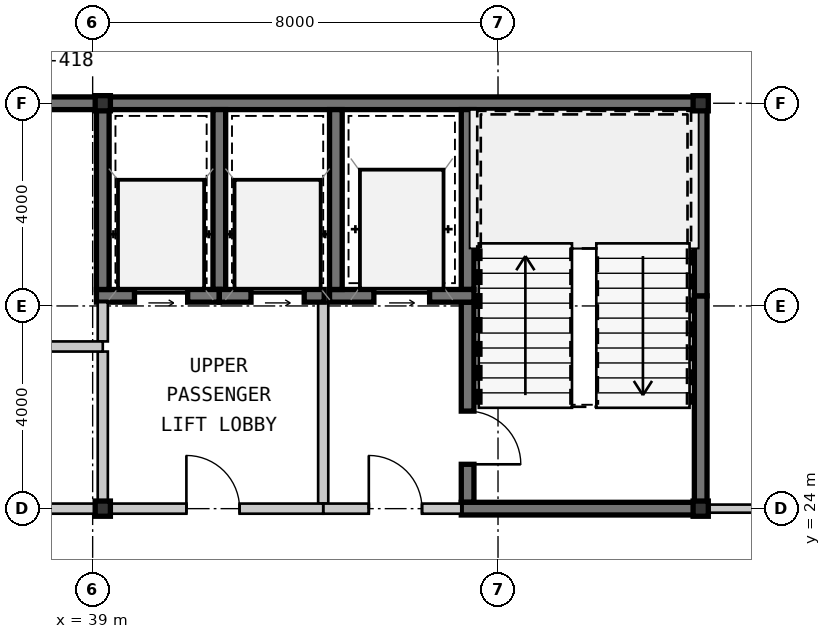
"""IFC4 building model, lengths in metres.
Left out: names, types, materials, properties, quantities, classifications, styles, units other than length and angle.
Written with IfcOpenShell. Run it as: python <this file> out.ifc"""

import sys

from ifc_helpers import new_model, si_unit, direction, frame, frame_2d, origin, origin_2d, place, context, subcontext, project, spatial, rectangle, hollow_rectangle, extrude, source, transform, mapped, element, fill, save


model = new_model("IFC4")
c1 = context("Model", 3, precision=1e-05, world=origin(), true_north=direction((0.0, 1.0)))
c2 = subcontext(c1, "Body", "Model", "MODEL_VIEW")
j1 = project(units=[si_unit("LENGTHUNIT", "METRE"), si_unit("PLANEANGLEUNIT", "RADIAN")], contexts=[c1])
p1 = place(None, origin())
s1 = spatial("IfcSite", under=j1, at=p1, CompositionType="ELEMENT")
p2 = place(p1, origin())
s2 = spatial("IfcBuilding", under=s1, at=p2, CompositionType="ELEMENT")
p3 = place(p2, frame((0.0, 0.0, 211.4)))
s3 = spatial("IfcBuildingStorey", under=s2, at=p3, CompositionType="ELEMENT", Elevation=211.4)
m1 = source(origin(), c2, "Body", "SweptSolid", [
    extrude(hollow_rectangle(XDim=0.3, YDim=0.3, WallThickness=0.012, at=origin_2d()), origin(), (0.0, 0.0, 1.0), 3.15),
])
for number, where, z_axis, x_axis in (
    (1, (39.2, 24.0, 0.0), (0.0, 0.0, 1.0), (1.0, 0.0, 0.0)),
    (2, (51.0, 24.0, 0.0), (0.0, 0.0, 1.0), (1.0, 0.0, 0.0)),
    (3, (39.2, 32.0, 0.0), (0.0, 0.0, 1.0), (1.0, 0.0, 0.0)),
    (4, (51.0, 32.0, 0.0), (0.0, 0.0, 1.0), (1.0, 0.0, 0.0)),
):
    element("IfcColumn", number, at=place(p3, frame(where, z_axis=z_axis, x_axis=x_axis)), inside=s3, PredefinedType="COLUMN", context=c2, shape_type="MappedRepresentation", body=[
        mapped(m1, transform((0.0, 0.0, 0.0), scale=1.0)),
    ])
m2 = source(origin(), c2, "Body", "SweptSolid", [
    extrude(rectangle(XDim=11.2, YDim=0.25, at=frame_2d((5.6, 0.0))), origin(), (0.0, 0.0, 1.0), 2.93),
])
p4 = place(p3, frame((28.0, 32.0, 0.0), z_axis=(0.0, 0.0, 1.0), x_axis=(1.0, 0.0, 0.0)))
e5 = element("IfcWall", 5, at=p4, inside=s3, PredefinedType="SHEAR", context=c2, shape_type="MappedRepresentation", body=[
    mapped(m2, transform((0.0, 0.0, 0.0), scale=1.0)),
])
m3 = source(origin(), c2, "Body", "SweptSolid", [
    extrude(rectangle(XDim=11.925, YDim=0.25, at=frame_2d((5.962, 0.0))), origin(), (0.0, 0.0, 1.0), 2.93),
])
p5 = place(p3, frame((39.2, 32.0, 0.0), z_axis=(0.0, 0.0, 1.0), x_axis=(1.0, 0.0, 0.0)))
e6 = element("IfcWall", 6, at=p5, inside=s3, PredefinedType="SHEAR", context=c2, shape_type="MappedRepresentation", body=[
    mapped(m3, transform((0.0, 0.0, 0.0), scale=1.0)),
])
m4 = source(origin(), c2, "Body", "SweptSolid", [
    extrude(rectangle(XDim=4.075, YDim=0.25, at=frame_2d((2.038, 0.0))), origin(), (0.0, 0.0, 1.0), 2.93),
])
p6 = place(p3, frame((51.0, 24.125, 0.0), z_axis=(0.0, 0.0, 1.0), x_axis=(0.0, 1.0, 0.0)))
e7 = element("IfcWall", 7, at=p6, inside=s3, PredefinedType="SHEAR", context=c2, shape_type="MappedRepresentation", body=[
    mapped(m4, transform((0.0, 0.0, 0.0), scale=1.0)),
])
m5 = source(origin(), c2, "Body", "SweptSolid", [
    extrude(rectangle(XDim=3.675, YDim=0.25, at=frame_2d((1.837, 0.0))), origin(), (0.0, 0.0, 1.0), 2.93),
])
p7 = place(p3, frame((51.0, 28.2, 0.0), z_axis=(0.0, 0.0, 1.0), x_axis=(0.0, 1.0, 0.0)))
e8 = element("IfcWall", 8, at=p7, inside=s3, PredefinedType="SHEAR", context=c2, shape_type="MappedRepresentation", body=[
    mapped(m5, transform((0.0, 0.0, 0.0), scale=1.0)),
])
m6 = source(origin(), c2, "Body", "SweptSolid", [
    extrude(rectangle(XDim=3.55, YDim=0.25, at=frame_2d((1.775, 0.0))), origin(), (0.0, 0.0, 1.0), 2.93),
])
p8 = place(p3, frame((46.4, 31.875, 0.0), z_axis=(0.0, 0.0, 1.0), x_axis=(0.0, -1.0, 0.0)))
e9 = element("IfcWall", 9, at=p8, inside=s3, PredefinedType="SHEAR", context=c2, shape_type="MappedRepresentation", body=[
    mapped(m6, transform((0.0, 0.0, 0.0), scale=1.0)),
])
m7 = source(origin(), c2, "Body", "SweptSolid", [
    extrude(rectangle(XDim=3.95, YDim=0.25, at=frame_2d((1.975, 0.0))), origin(), (0.0, 0.0, 1.0), 2.93),
])
p9 = place(p3, frame((46.4, 28.075, 0.0), z_axis=(0.0, 0.0, 1.0), x_axis=(0.0, -1.0, 0.0)))
e10 = element("IfcWall", 10, at=p9, inside=s3, PredefinedType="SHEAR", context=c2, shape_type="MappedRepresentation", body=[
    mapped(m7, transform((0.0, 0.0, 0.0), scale=1.0)),
])
m8 = source(origin(), c2, "Body", "SweptSolid", [
    extrude(rectangle(XDim=1.05, YDim=2.1, at=frame_2d((0.525, 1.05))), frame((0.0, 0.135, 0.0), z_axis=(0.0, -1.0, 0.0), x_axis=(1.0, 0.0, 0.0)), (0.0, 0.0, 1.0), 0.27),
])
p10 = place(p9, frame((2.15, 0.0, 0.0)))
e11 = element("IfcOpeningElement", 11, at=p10, cuts=e10, PredefinedType="OPENING", context=c2, shape_type="MappedRepresentation", body=[
    mapped(m8, transform((0.0, 0.0, 0.0), scale=1.0)),
])
m9 = source(origin(), c2, "Body", "SweptSolid", [
    extrude(rectangle(XDim=4.85, YDim=0.25, at=frame_2d((2.425, 0.0))), origin(), (0.0, 0.0, 1.0), 2.93),
])
p11 = place(p3, frame((46.275, 24.0, 0.0), z_axis=(0.0, 0.0, 1.0), x_axis=(1.0, 0.0, 0.0)))
e12 = element("IfcWall", 12, at=p11, inside=s3, PredefinedType="SHEAR", context=c2, shape_type="MappedRepresentation", body=[
    mapped(m9, transform((0.0, 0.0, 0.0), scale=1.0)),
])
m10 = source(origin(), c2, "Body", "SweptSolid", [
    extrude(rectangle(XDim=2.85, YDim=0.25, at=frame_2d((1.425, 0.0))), origin(), (0.0, 0.0, 1.0), 2.93),
])
p12 = place(p3, frame((43.675, 28.2, 0.0), z_axis=(0.0, 0.0, 1.0), x_axis=(1.0, 0.0, 0.0)))
e13 = element("IfcWall", 13, at=p12, inside=s3, PredefinedType="SHEAR", context=c2, shape_type="MappedRepresentation", body=[
    mapped(m10, transform((0.0, 0.0, 0.0), scale=1.0)),
])
m11 = source(origin(), c2, "Body", "SweptSolid", [
    extrude(rectangle(XDim=1.1, YDim=2.15, at=frame_2d((0.55, 1.075))), frame((0.0, 0.135, 0.0), z_axis=(0.0, -1.0, 0.0), x_axis=(1.0, 0.0, 0.0)), (0.0, 0.0, 1.0), 0.27),
])
p13 = place(p12, frame((0.875, 0.0, 0.0)))
e14 = element("IfcOpeningElement", 14, at=p13, cuts=e13, PredefinedType="OPENING", context=c2, shape_type="MappedRepresentation", body=[
    mapped(m11, transform((0.0, 0.0, 0.0), scale=1.0)),
])
p14 = place(p3, frame((43.8, 31.875, 0.0), z_axis=(0.0, 0.0, 1.0), x_axis=(0.0, -1.0, 0.0)))
e15 = element("IfcWall", 15, at=p14, inside=s3, PredefinedType="SHEAR", context=c2, shape_type="MappedRepresentation", body=[
    mapped(m6, transform((0.0, 0.0, 0.0), scale=1.0)),
])
m12 = source(origin(), c2, "Body", "SweptSolid", [
    extrude(rectangle(XDim=3.975, YDim=0.2, at=frame_2d((1.987, 0.0))), origin(), (0.0, 0.0, 1.0), 2.93),
])
p15 = place(p3, frame((43.55, 28.075, 0.0), z_axis=(0.0, 0.0, 1.0), x_axis=(0.0, -1.0, 0.0)))
e16 = element("IfcWall", 16, at=p15, inside=s3, PredefinedType="SOLIDWALL", context=c2, shape_type="MappedRepresentation", body=[
    mapped(m12, transform((0.0, 0.0, 0.0), scale=1.0)),
])
m13 = source(origin(), c2, "Body", "SweptSolid", [
    extrude(rectangle(XDim=2.725, YDim=0.2, at=frame_2d((1.362, 0.0))), origin(), (0.0, 0.0, 1.0), 2.397),
])
p16 = place(p3, frame((43.55, 24.0, 0.0), z_axis=(0.0, 0.0, 1.0), x_axis=(1.0, 0.0, 0.0)))
e17 = element("IfcWall", 17, at=p16, inside=s3, PredefinedType="SOLIDWALL", context=c2, shape_type="MappedRepresentation", body=[
    mapped(m13, transform((0.0, 0.0, 0.0), scale=1.0)),
])
m14 = source(origin(), c2, "Body", "SweptSolid", [
    extrude(rectangle(XDim=1.05, YDim=2.1, at=frame_2d((0.525, 1.05))), frame((0.0, 0.11, 0.0), z_axis=(0.0, -1.0, 0.0), x_axis=(1.0, 0.0, 0.0)), (0.0, 0.0, 1.0), 0.22),
])
p17 = place(p16, frame((0.9, 0.0, 0.0)))
e18 = element("IfcOpeningElement", 18, at=p17, cuts=e17, PredefinedType="OPENING", context=c2, shape_type="MappedRepresentation", body=[
    mapped(m14, transform((0.0, 0.0, 0.0), scale=1.0)),
])
p18 = place(p3, frame((41.5, 28.325, 0.0), z_axis=(0.0, 0.0, 1.0), x_axis=(0.0, 1.0, 0.0)))
e19 = element("IfcWall", 19, at=p18, inside=s3, PredefinedType="SHEAR", context=c2, shape_type="MappedRepresentation", body=[
    mapped(m6, transform((0.0, 0.0, 0.0), scale=1.0)),
])
m15 = source(origin(), c2, "Body", "SweptSolid", [
    extrude(rectangle(XDim=2.425, YDim=0.25, at=frame_2d((1.212, 0.0))), origin(), (0.0, 0.0, 1.0), 2.93),
])
p19 = place(p3, frame((39.075, 28.2, 0.0), z_axis=(0.0, 0.0, 1.0), x_axis=(1.0, 0.0, 0.0)))
e20 = element("IfcWall", 20, at=p19, inside=s3, PredefinedType="SHEAR", context=c2, shape_type="MappedRepresentation", body=[
    mapped(m15, transform((0.0, 0.0, 0.0), scale=1.0)),
])
m16 = source(origin(), c2, "Body", "SweptSolid", [
    extrude(rectangle(XDim=1.05, YDim=2.15, at=frame_2d((0.525, 1.075))), frame((0.0, 0.135, 0.0), z_axis=(0.0, -1.0, 0.0), x_axis=(1.0, 0.0, 0.0)), (0.0, 0.0, 1.0), 0.27),
])
p20 = place(p19, frame((0.75, 0.0, 0.0)))
e21 = element("IfcOpeningElement", 21, at=p20, cuts=e20, PredefinedType="OPENING", context=c2, shape_type="MappedRepresentation", body=[
    mapped(m16, transform((0.0, 0.0, 0.0), scale=1.0)),
])
p21 = place(p3, frame((39.2, 31.875, 0.0), z_axis=(0.0, 0.0, 1.0), x_axis=(0.0, -1.0, 0.0)))
e22 = element("IfcWall", 22, at=p21, inside=s3, PredefinedType="SHEAR", context=c2, shape_type="MappedRepresentation", body=[
    mapped(m6, transform((0.0, 0.0, 0.0), scale=1.0)),
])
m17 = source(origin(), c2, "Body", "SweptSolid", [
    extrude(rectangle(XDim=2.07, YDim=0.25, at=frame_2d((1.035, 0.0))), origin(), (0.0, 0.0, 1.0), 2.93),
])
p22 = place(p3, frame((41.5, 28.2, 0.0), z_axis=(0.0, 0.0, 1.0), x_axis=(1.0, 0.0, 0.0)))
e23 = element("IfcWall", 23, at=p22, inside=s3, PredefinedType="SHEAR", context=c2, shape_type="MappedRepresentation", body=[
    mapped(m17, transform((0.0, 0.0, 0.0), scale=1.0)),
])
p23 = place(p22, frame((0.625, 0.0, 0.0)))
e24 = element("IfcOpeningElement", 24, at=p23, cuts=e23, PredefinedType="OPENING", context=c2, shape_type="MappedRepresentation", body=[
    mapped(m16, transform((0.0, 0.0, 0.0), scale=1.0)),
])
m18 = source(origin(), c2, "Body", "SweptSolid", [
    extrude(rectangle(XDim=3.0, YDim=0.2, at=frame_2d((1.5, 0.0))), origin(), (0.0, 0.0, 1.0), 2.47),
])
p24 = place(p3, frame((39.2, 24.1, 0.0), z_axis=(0.0, 0.0, 1.0), x_axis=(0.0, 1.0, 0.0)))
e25 = element("IfcWall", 25, at=p24, inside=s3, PredefinedType="SOLIDWALL", context=c2, shape_type="MappedRepresentation", body=[
    mapped(m18, transform((0.0, 0.0, 0.0), scale=1.0)),
])
m19 = source(origin(), c2, "Body", "SweptSolid", [
    extrude(rectangle(XDim=0.775, YDim=0.2, at=frame_2d((0.387, 0.0))), origin(), (0.0, 0.0, 1.0), 2.47),
])
p25 = place(p3, frame((39.2, 27.3, 0.0), z_axis=(0.0, 0.0, 1.0), x_axis=(0.0, 1.0, 0.0)))
e26 = element("IfcWall", 26, at=p25, inside=s3, PredefinedType="SOLIDWALL", context=c2, shape_type="MappedRepresentation", body=[
    mapped(m19, transform((0.0, 0.0, 0.0), scale=1.0)),
])
m20 = source(origin(), c2, "Body", "SweptSolid", [
    extrude(rectangle(XDim=4.35, YDim=0.2, at=frame_2d((2.175, 0.0))), origin(), (0.0, 0.0, 1.0), 2.397),
])
p26 = place(p3, frame((43.55, 24.0, 0.0), z_axis=(0.0, 0.0, 1.0), x_axis=(-1.0, 0.0, 0.0)))
e27 = element("IfcWall", 27, at=p26, inside=s3, PredefinedType="SOLIDWALL", context=c2, shape_type="MappedRepresentation", body=[
    mapped(m20, transform((0.0, 0.0, 0.0), scale=1.0)),
])
p27 = place(p26, frame((1.65, 0.0, 0.0)))
e28 = element("IfcOpeningElement", 28, at=p27, cuts=e27, PredefinedType="OPENING", context=c2, shape_type="MappedRepresentation", body=[
    mapped(m14, transform((0.0, 0.0, 0.0), scale=1.0)),
])
m21 = source(origin(), c2, "Body", "SweptSolid", [
    extrude(rectangle(XDim=4.05, YDim=0.2, at=frame_2d((2.025, 0.0))), origin(), (0.0, 0.0, 1.0), 2.93),
])
p28 = place(p3, frame((35.15, 27.2, 0.0), z_axis=(0.0, 0.0, 1.0), x_axis=(1.0, 0.0, 0.0)))
e29 = element("IfcWall", 29, at=p28, inside=s3, PredefinedType="SOLIDWALL", context=c2, shape_type="MappedRepresentation", body=[
    mapped(m21, transform((0.0, 0.0, 0.0), scale=1.0)),
])
p29 = place(p28, frame((0.42, 0.0, 0.0)))
e30 = element("IfcOpeningElement", 30, at=p29, cuts=e29, PredefinedType="OPENING", context=c2, shape_type="MappedRepresentation", body=[
    mapped(m14, transform((0.0, 0.0, 0.0), scale=1.0)),
])
m22 = source(origin(), c2, "Body", "SweptSolid", [
    extrude(rectangle(XDim=4.05, YDim=0.2, at=frame_2d((2.025, 0.0))), origin(), (0.0, 0.0, 1.0), 2.47),
])
p30 = place(p3, frame((39.2, 24.0, 0.0), z_axis=(0.0, 0.0, 1.0), x_axis=(-1.0, 0.0, 0.0)))
e31 = element("IfcWall", 31, at=p30, inside=s3, PredefinedType="SOLIDWALL", context=c2, shape_type="MappedRepresentation", body=[
    mapped(m22, transform((0.0, 0.0, 0.0), scale=1.0)),
])
p31 = place(p30, frame((1.5, 0.0, 0.0)))
e32 = element("IfcOpeningElement", 32, at=p31, cuts=e31, PredefinedType="OPENING", context=c2, shape_type="MappedRepresentation", body=[
    mapped(m14, transform((0.0, 0.0, 0.0), scale=1.0)),
])
m23 = source(origin(), c2, "Body", "SweptSolid", [
    extrude(rectangle(XDim=6.378, YDim=0.16, at=frame_2d((3.189, 0.0))), origin(), (0.0, 0.0, 1.0), 2.93),
])
p32 = place(p3, frame((51.125, 24.0, 0.0), z_axis=(0.0, 0.0, 1.0), x_axis=(1.0, 0.0, 0.0)))
e33 = element("IfcWall", 33, at=p32, inside=s3, PredefinedType="PARTITIONING", context=c2, shape_type="MappedRepresentation", body=[
    mapped(m23, transform((0.0, 0.0, 0.0), scale=1.0)),
])
m24 = source(origin(), c2, "Body", "SweptSolid", [
    extrude(rectangle(XDim=0.92, YDim=2.1, at=frame_2d((0.46, 1.05))), frame((0.0, 0.09, 0.0), z_axis=(0.0, -1.0, 0.0), x_axis=(1.0, 0.0, 0.0)), (0.0, 0.0, 1.0), 0.18),
])
p33 = place(p32, frame((2.677, 0.0, 0.0)))
e34 = element("IfcOpeningElement", 34, at=p33, cuts=e33, PredefinedType="OPENING", context=c2, shape_type="MappedRepresentation", body=[
    mapped(m24, transform((0.0, 0.0, 0.0), scale=1.0)),
])
m25 = source(origin(), c2, "Body", "SweptSolid", [
    extrude(rectangle(XDim=1.05, YDim=2.1, at=frame_2d((0.525, 1.05))), frame((0.0, 0.025, 0.0), z_axis=(0.0, -1.0, 0.0), x_axis=(1.0, 0.0, 0.0)), (0.0, 0.0, 1.0), 0.05),
])
p34 = place(p10, origin())
e35 = element("IfcDoor", 35, at=p34, inside=s3, OperationType="SINGLE_SWING_RIGHT", PredefinedType="DOOR", context=c2, shape_type="MappedRepresentation", body=[
    mapped(m25, transform((0.0, 0.0, 0.0), scale=1.0)),
])
fill(e11, e35)
m26 = source(origin(), c2, "Body", "SweptSolid", [
    extrude(rectangle(XDim=1.1, YDim=2.15, at=frame_2d((0.55, 1.075))), frame((0.0, 0.025, 0.0), z_axis=(0.0, -1.0, 0.0), x_axis=(1.0, 0.0, 0.0)), (0.0, 0.0, 1.0), 0.05),
])
p35 = place(p13, origin())
e36 = element("IfcDoor", 36, at=p35, inside=s3, OperationType="SLIDING_TO_LEFT", PredefinedType="DOOR", context=c2, shape_type="MappedRepresentation", body=[
    mapped(m26, transform((0.0, 0.0, 0.0), scale=1.0)),
])
fill(e14, e36)
p36 = place(p17, origin())
e37 = element("IfcDoor", 37, at=p36, inside=s3, OperationType="SINGLE_SWING_LEFT", PredefinedType="DOOR", context=c2, shape_type="MappedRepresentation", body=[
    mapped(m25, transform((0.0, 0.0, 0.0), scale=1.0)),
])
fill(e18, e37)
m27 = source(origin(), c2, "Body", "SweptSolid", [
    extrude(rectangle(XDim=1.05, YDim=2.15, at=frame_2d((0.525, 1.075))), frame((0.0, 0.025, 0.0), z_axis=(0.0, -1.0, 0.0), x_axis=(1.0, 0.0, 0.0)), (0.0, 0.0, 1.0), 0.05),
])
p37 = place(p20, origin())
e38 = element("IfcDoor", 38, at=p37, inside=s3, OperationType="SLIDING_TO_LEFT", PredefinedType="DOOR", context=c2, shape_type="MappedRepresentation", body=[
    mapped(m27, transform((0.0, 0.0, 0.0), scale=1.0)),
])
fill(e21, e38)
p38 = place(p23, origin())
e39 = element("IfcDoor", 39, at=p38, inside=s3, OperationType="SLIDING_TO_LEFT", PredefinedType="DOOR", context=c2, shape_type="MappedRepresentation", body=[
    mapped(m27, transform((0.0, 0.0, 0.0), scale=1.0)),
])
fill(e24, e39)
p39 = place(p27, frame((1.05, 0.0, 0.0), z_axis=(0.0, 0.0, 1.0), x_axis=(-1.0, 0.0, 0.0)))
e40 = element("IfcDoor", 40, at=p39, inside=s3, OperationType="SINGLE_SWING_LEFT", PredefinedType="DOOR", context=c2, shape_type="MappedRepresentation", body=[
    mapped(m25, transform((0.0, 0.0, 0.0), scale=1.0)),
])
fill(e28, e40)
save(model, sys.argv[1])
